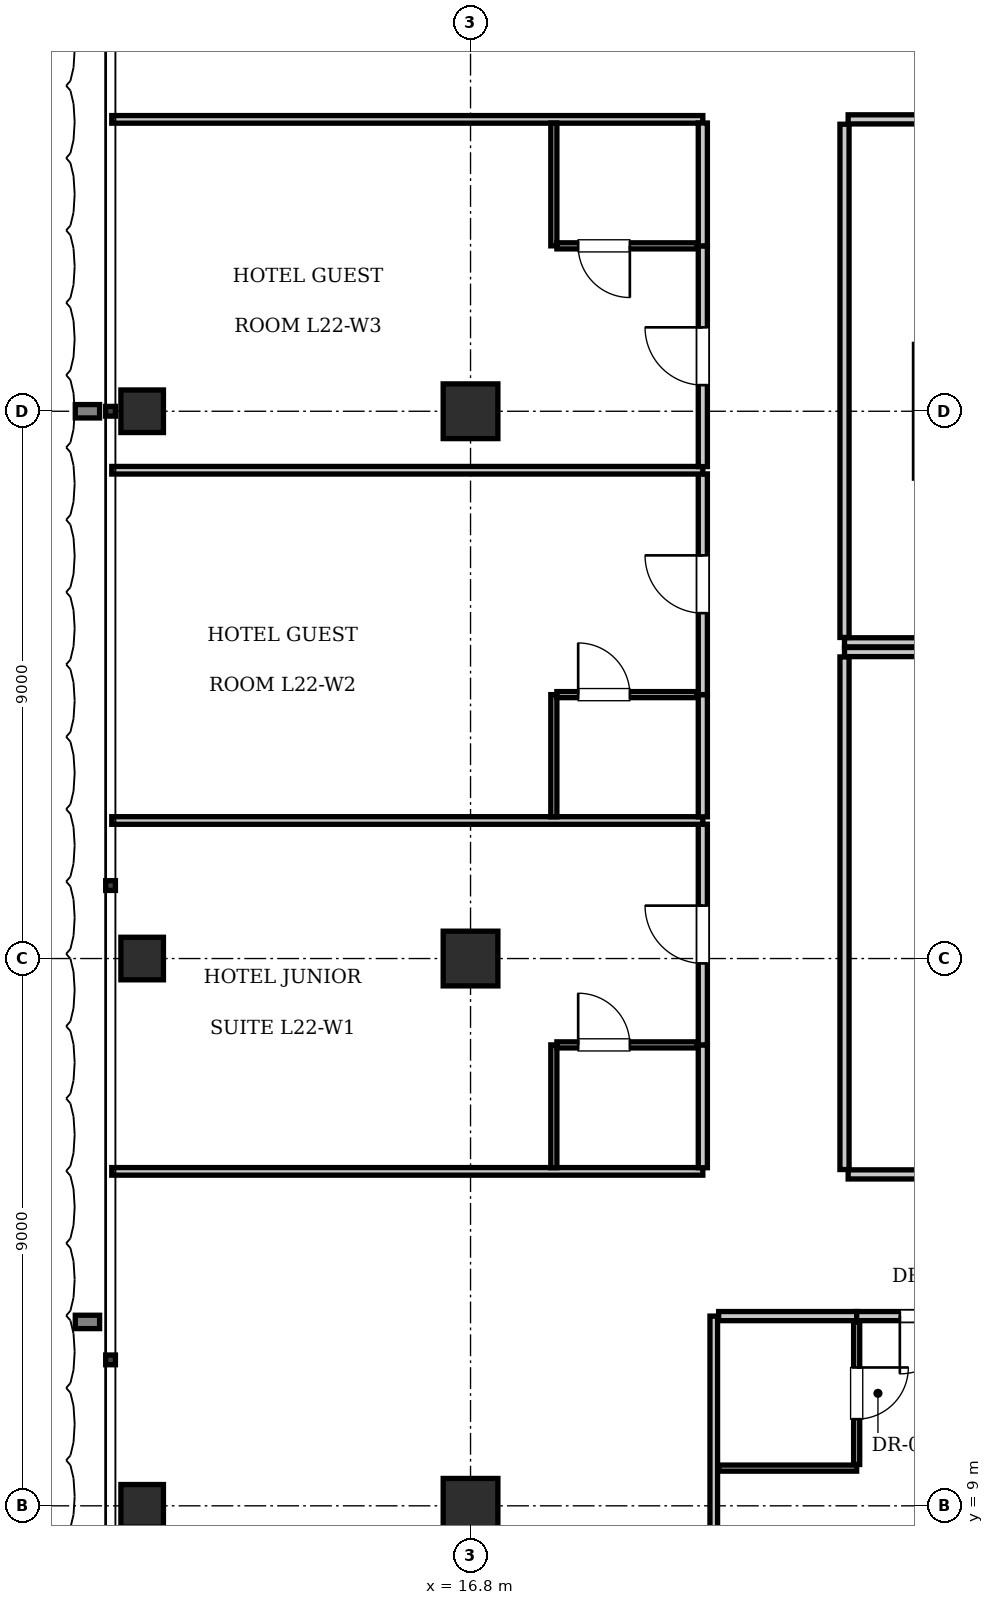
"""IFC4 building model, lengths in metres.
Left out: names, types, materials, properties, quantities, classifications, styles, units other than length and angle.
Written with IfcOpenShell. Run it as: python <this file> out.ifc"""

import sys

from ifc_helpers import new_model, si_unit, direction, frame, frame_2d, origin, origin_2d, place, context, subcontext, project, spatial, rectangle, i_section, extrude, element, fill, save


model = new_model("IFC4")
c1 = context("Model", 3, precision=1e-05, world=origin(), true_north=direction((0.0, 1.0)))
c2 = subcontext(c1, "Body", "Model", "MODEL_VIEW")
j1 = project(units=[si_unit("LENGTHUNIT", "METRE"), si_unit("PLANEANGLEUNIT", "RADIAN")], contexts=[c1])
p1 = place(None, origin())
s1 = spatial("IfcSite", under=j1, at=p1, CompositionType="ELEMENT")
p2 = place(p1, origin())
s2 = spatial("IfcBuilding", under=s1, at=p2, CompositionType="ELEMENT")
p3 = place(p2, frame((0.0, 0.0, 92.4)))
s3 = spatial("IfcBuildingStorey", under=s2, at=p3, CompositionType="ELEMENT", Elevation=92.4)
for number, where, z_axis, x_axis in (
    (1, (16.8, 9.0, 0.0), (0.0, 0.0, 1.0), (1.0, 0.0, 0.0)),
    (2, (16.8, 18.0, 0.0), (0.0, 0.0, 1.0), (1.0, 0.0, 0.0)),
    (3, (16.8, 27.0, 0.0), (0.0, 0.0, 1.0), (1.0, 0.0, 0.0)),
):
    element("IfcColumn", number, at=place(p3, frame(where, z_axis=z_axis, x_axis=x_axis)), inside=s3, PredefinedType="COLUMN", context=c2, shape_type="SweptSolid", body=[
        extrude(rectangle(XDim=0.9, YDim=0.9, at=origin_2d()), origin(), (0.0, 0.0, 1.0), 3.85),
    ])
for number, where, z_axis, x_axis in (
    (4, (11.4, 9.0, 0.0), (0.0, 0.0, 1.0), (1.0, 0.0, 0.0)),
    (5, (11.4, 18.0, 0.0), (0.0, 0.0, 1.0), (1.0, 0.0, 0.0)),
    (6, (11.4, 27.0, 0.0), (0.0, 0.0, 1.0), (1.0, 0.0, 0.0)),
):
    element("IfcColumn", number, at=place(p3, frame(where, z_axis=z_axis, x_axis=x_axis)), inside=s3, PredefinedType="COLUMN", context=c2, shape_type="SweptSolid", body=[
        extrude(i_section(OverallWidth=0.7, OverallDepth=0.7, WebThickness=0.028, FlangeThickness=0.044, at=origin_2d()), origin(), (0.0, 0.0, 1.0), 3.85),
    ])
p4 = place(p3, frame((22.95, 23.2, 0.0), z_axis=(0.0, 0.0, 1.0), x_axis=(1.0, 0.0, 0.0)))
e7 = element("IfcWall", 7, at=p4, inside=s3, PredefinedType="PARTITIONING", context=c2, shape_type="SweptSolid", body=[
    extrude(rectangle(XDim=29.7, YDim=0.15, at=frame_2d((14.85, 0.0))), origin(), (0.0, 0.0, 1.0), 3.61),
])
p5 = place(p3, frame((22.95, 23.28, 0.0), z_axis=(0.0, 0.0, 1.0), x_axis=(0.0, 1.0, 0.0)))
e8 = element("IfcWall", 8, at=p5, inside=s3, PredefinedType="PARTITIONING", context=c2, shape_type="SweptSolid", body=[
    extrude(rectangle(XDim=8.44, YDim=0.15, at=frame_2d((4.22, 0.0))), origin(), (0.0, 0.0, 1.0), 3.61),
])
p6 = place(p3, frame((23.01, 31.8, 0.0), z_axis=(0.0, 0.0, 1.0), x_axis=(1.0, 0.0, 0.0)))
e9 = element("IfcWall", 9, at=p6, inside=s3, PredefinedType="PARTITIONING", context=c2, shape_type="SweptSolid", body=[
    extrude(rectangle(XDim=4.662, YDim=0.15, at=frame_2d((2.331, 0.0))), origin(), (0.0, 0.0, 1.0), 3.61),
])
p7 = place(p6, frame((1.881, 0.0, 0.0)))
e10 = element("IfcOpeningElement", 10, at=p7, cuts=e9, PredefinedType="OPENING", context=c2, shape_type="SweptSolid", body=[
    extrude(rectangle(XDim=0.9, YDim=2.1, at=frame_2d((0.45, 1.05))), frame((0.0, 0.085, 0.0), z_axis=(0.0, -1.0, 0.0), x_axis=(1.0, 0.0, 0.0)), (0.0, 0.0, 1.0), 0.17),
])
p8 = place(p3, frame((22.95, 23.04, 0.0), z_axis=(0.0, 0.0, 1.0), x_axis=(1.0, 0.0, 0.0)))
e11 = element("IfcWall", 11, at=p8, inside=s3, PredefinedType="PARTITIONING", context=c2, shape_type="SweptSolid", body=[
    extrude(rectangle(XDim=29.7, YDim=0.15, at=frame_2d((14.85, 0.0))), origin(), (0.0, 0.0, 1.0), 3.61),
])
p9 = place(p3, frame((22.95, 14.53, 0.0), z_axis=(0.0, 0.0, 1.0), x_axis=(0.0, 1.0, 0.0)))
e12 = element("IfcWall", 12, at=p9, inside=s3, PredefinedType="PARTITIONING", context=c2, shape_type="SweptSolid", body=[
    extrude(rectangle(XDim=8.43, YDim=0.15, at=frame_2d((4.215, 0.0))), origin(), (0.0, 0.0, 1.0), 3.61),
])
p10 = place(p3, frame((23.01, 14.45, 0.0), z_axis=(0.0, 0.0, 1.0), x_axis=(1.0, 0.0, 0.0)))
e13 = element("IfcWall", 13, at=p10, inside=s3, PredefinedType="PARTITIONING", context=c2, shape_type="SweptSolid", body=[
    extrude(rectangle(XDim=10.899, YDim=0.15, at=frame_2d((5.449, 0.0))), origin(), (0.0, 0.0, 1.0), 3.61),
])
p11 = place(p10, frame((5.0, 0.0, 0.0)))
e14 = element("IfcOpeningElement", 14, at=p11, cuts=e13, PredefinedType="OPENING", context=c2, shape_type="SweptSolid", body=[
    extrude(rectangle(XDim=0.9, YDim=2.1, at=frame_2d((0.45, 1.05))), frame((0.0, 0.085, 0.0), z_axis=(0.0, -1.0, 0.0), x_axis=(1.0, 0.0, 0.0)), (0.0, 0.0, 1.0), 0.17),
])
p12 = place(p3, frame((20.8, 0.1, 0.0), z_axis=(0.0, 0.0, 1.0), x_axis=(0.0, 1.0, 0.0)))
e15 = element("IfcWall", 15, at=p12, inside=s3, PredefinedType="PARTITIONING", context=c2, shape_type="SweptSolid", body=[
    extrude(rectangle(XDim=12.02, YDim=0.125, at=frame_2d((6.01, 0.0))), origin(), (0.0, 0.0, 1.0), 3.61),
])
p13 = place(p3, frame((20.88, 12.12, 0.0), z_axis=(0.0, 0.0, 1.0), x_axis=(1.0, 0.0, 0.0)))
e16 = element("IfcWall", 16, at=p13, inside=s3, PredefinedType="PARTITIONING", context=c2, shape_type="SweptSolid", body=[
    extrude(rectangle(XDim=2.27, YDim=0.15, at=frame_2d((1.135, 0.0))), origin(), (0.0, 0.0, 1.0), 3.61),
])
p14 = place(p3, frame((20.88, 9.62, 0.0), z_axis=(0.0, 0.0, 1.0), x_axis=(1.0, 0.0, 0.0)))
e17 = element("IfcWall", 17, at=p14, inside=s3, PredefinedType="PARTITIONING", context=c2, shape_type="SweptSolid", body=[
    extrude(rectangle(XDim=2.27, YDim=0.1, at=frame_2d((1.135, 0.0))), origin(), (0.0, 0.0, 1.0), 3.61),
])
p15 = place(p3, frame((23.15, 9.68, 0.0), z_axis=(0.0, 0.0, 1.0), x_axis=(0.0, 1.0, 0.0)))
e18 = element("IfcWall", 18, at=p15, inside=s3, PredefinedType="PARTITIONING", context=c2, shape_type="SweptSolid", body=[
    extrude(rectangle(XDim=2.34, YDim=0.1, at=frame_2d((1.17, 0.0))), origin(), (0.0, 0.0, 1.0), 3.61),
])
p16 = place(p15, frame((0.745, 0.0, 0.0)))
e19 = element("IfcOpeningElement", 19, at=p16, cuts=e18, PredefinedType="OPENING", context=c2, shape_type="SweptSolid", body=[
    extrude(rectangle(XDim=0.85, YDim=2.1, at=frame_2d((0.425, 1.05))), frame((0.0, 0.06, 0.0), z_axis=(0.0, -1.0, 0.0), x_axis=(1.0, 0.0, 0.0)), (0.0, 0.0, 1.0), 0.12),
])
p17 = place(p3, frame((23.15, 12.12, 0.0), z_axis=(0.0, 0.0, 1.0), x_axis=(1.0, 0.0, 0.0)))
e20 = element("IfcWall", 20, at=p17, inside=s3, PredefinedType="PARTITIONING", context=c2, shape_type="SweptSolid", body=[
    extrude(rectangle(XDim=2.37, YDim=0.15, at=frame_2d((1.185, 0.0))), origin(), (0.0, 0.0, 1.0), 3.61),
])
p18 = place(p17, frame((0.71, 0.0, 0.0)))
e21 = element("IfcOpeningElement", 21, at=p18, cuts=e20, PredefinedType="OPENING", context=c2, shape_type="SweptSolid", body=[
    extrude(rectangle(XDim=0.95, YDim=2.15, at=frame_2d((0.475, 1.075))), frame((0.0, 0.085, 0.0), z_axis=(0.0, -1.0, 0.0), x_axis=(1.0, 0.0, 0.0)), (0.0, 0.0, 1.0), 0.17),
])
for number, where, z_axis, x_axis in (
    (22, (10.9, 14.5, 0.0), (0.0, 0.0, 1.0), (1.0, 0.0, 0.0)),
    (23, (10.9, 31.8, 0.0), (0.0, 0.0, 1.0), (1.0, 0.0, 0.0)),
):
    element("IfcWall", number, at=place(p3, frame(where, z_axis=z_axis, x_axis=x_axis)), inside=s3, PredefinedType="PARTITIONING", context=c2, shape_type="SweptSolid", body=[
        extrude(rectangle(XDim=9.72, YDim=0.125, at=frame_2d((4.86, 0.0))), origin(), (0.0, 0.0, 1.0), 3.61),
    ])
p19 = place(p3, frame((20.62, 14.56, 0.0), z_axis=(0.0, 0.0, 1.0), x_axis=(0.0, 1.0, 0.0)))
e24 = element("IfcWall", 24, at=p19, inside=s3, PredefinedType="PARTITIONING", context=c2, shape_type="SweptSolid", body=[
    extrude(rectangle(XDim=2.02, YDim=0.15, at=frame_2d((1.01, 0.0))), origin(), (0.0, 0.0, 1.0), 3.61),
])
p20 = place(p3, frame((20.62, 16.58, 0.0), z_axis=(0.0, 0.0, 1.0), x_axis=(0.0, 1.0, 0.0)))
e25 = element("IfcWall", 25, at=p20, inside=s3, PredefinedType="PARTITIONING", context=c2, shape_type="SweptSolid", body=[
    extrude(rectangle(XDim=3.63, YDim=0.15, at=frame_2d((1.815, 0.0))), origin(), (0.0, 0.0, 1.0), 3.61),
])
p21 = place(p20, frame((1.34, 0.0, 0.0)))
e26 = element("IfcOpeningElement", 26, at=p21, cuts=e25, PredefinedType="OPENING", context=c2, shape_type="SweptSolid", body=[
    extrude(rectangle(XDim=0.95, YDim=2.15, at=frame_2d((0.475, 1.075))), frame((0.0, 0.085, 0.0), z_axis=(0.0, -1.0, 0.0), x_axis=(1.0, 0.0, 0.0)), (0.0, 0.0, 1.0), 0.17),
])
p22 = place(p3, frame((18.17, 14.56, 0.0), z_axis=(0.0, 0.0, 1.0), x_axis=(0.0, 1.0, 0.0)))
e27 = element("IfcWall", 27, at=p22, inside=s3, PredefinedType="PARTITIONING", context=c2, shape_type="SweptSolid", body=[
    extrude(rectangle(XDim=2.02, YDim=0.1, at=frame_2d((1.01, 0.0))), origin(), (0.0, 0.0, 1.0), 3.61),
])
p23 = place(p3, frame((18.22, 16.58, 0.0), z_axis=(0.0, 0.0, 1.0), x_axis=(1.0, 0.0, 0.0)))
e28 = element("IfcWall", 28, at=p23, inside=s3, PredefinedType="PARTITIONING", context=c2, shape_type="SweptSolid", body=[
    extrude(rectangle(XDim=2.3, YDim=0.1, at=frame_2d((1.15, 0.0))), origin(), (0.0, 0.0, 1.0), 3.61),
])
p24 = place(p23, frame((0.35, 0.0, 0.0)))
e29 = element("IfcOpeningElement", 29, at=p24, cuts=e28, PredefinedType="OPENING", context=c2, shape_type="SweptSolid", body=[
    extrude(rectangle(XDim=0.85, YDim=2.1, at=frame_2d((0.425, 1.05))), frame((0.0, 0.06, 0.0), z_axis=(0.0, -1.0, 0.0), x_axis=(1.0, 0.0, 0.0)), (0.0, 0.0, 1.0), 0.12),
])
p25 = place(p3, frame((10.9, 20.27, 0.0), z_axis=(0.0, 0.0, 1.0), x_axis=(1.0, 0.0, 0.0)))
e30 = element("IfcWall", 30, at=p25, inside=s3, PredefinedType="PARTITIONING", context=c2, shape_type="SweptSolid", body=[
    extrude(rectangle(XDim=9.72, YDim=0.125, at=frame_2d((4.86, 0.0))), origin(), (0.0, 0.0, 1.0), 3.61),
])
p26 = place(p3, frame((20.62, 20.33, 0.0), z_axis=(0.0, 0.0, 1.0), x_axis=(0.0, 1.0, 0.0)))
e31 = element("IfcWall", 31, at=p26, inside=s3, PredefinedType="PARTITIONING", context=c2, shape_type="SweptSolid", body=[
    extrude(rectangle(XDim=2.01, YDim=0.15, at=frame_2d((1.005, 0.0))), origin(), (0.0, 0.0, 1.0), 3.61),
])
p27 = place(p3, frame((20.62, 22.34, 0.0), z_axis=(0.0, 0.0, 1.0), x_axis=(0.0, 1.0, 0.0)))
e32 = element("IfcWall", 32, at=p27, inside=s3, PredefinedType="PARTITIONING", context=c2, shape_type="SweptSolid", body=[
    extrude(rectangle(XDim=3.63, YDim=0.15, at=frame_2d((1.815, 0.0))), origin(), (0.0, 0.0, 1.0), 3.61),
])
p28 = place(p27, frame((1.34, 0.0, 0.0)))
e33 = element("IfcOpeningElement", 33, at=p28, cuts=e32, PredefinedType="OPENING", context=c2, shape_type="SweptSolid", body=[
    extrude(rectangle(XDim=0.95, YDim=2.15, at=frame_2d((0.475, 1.075))), frame((0.0, 0.085, 0.0), z_axis=(0.0, -1.0, 0.0), x_axis=(1.0, 0.0, 0.0)), (0.0, 0.0, 1.0), 0.17),
])
p29 = place(p3, frame((18.17, 20.33, 0.0), z_axis=(0.0, 0.0, 1.0), x_axis=(0.0, 1.0, 0.0)))
e34 = element("IfcWall", 34, at=p29, inside=s3, PredefinedType="PARTITIONING", context=c2, shape_type="SweptSolid", body=[
    extrude(rectangle(XDim=2.01, YDim=0.1, at=frame_2d((1.005, 0.0))), origin(), (0.0, 0.0, 1.0), 3.61),
])
p30 = place(p3, frame((18.22, 22.34, 0.0), z_axis=(0.0, 0.0, 1.0), x_axis=(1.0, 0.0, 0.0)))
e35 = element("IfcWall", 35, at=p30, inside=s3, PredefinedType="PARTITIONING", context=c2, shape_type="SweptSolid", body=[
    extrude(rectangle(XDim=2.3, YDim=0.1, at=frame_2d((1.15, 0.0))), origin(), (0.0, 0.0, 1.0), 3.61),
])
p31 = place(p30, frame((0.35, 0.0, 0.0)))
e36 = element("IfcOpeningElement", 36, at=p31, cuts=e35, PredefinedType="OPENING", context=c2, shape_type="SweptSolid", body=[
    extrude(rectangle(XDim=0.85, YDim=2.1, at=frame_2d((0.425, 1.05))), frame((0.0, 0.06, 0.0), z_axis=(0.0, -1.0, 0.0), x_axis=(1.0, 0.0, 0.0)), (0.0, 0.0, 1.0), 0.12),
])
p32 = place(p3, frame((10.9, 26.03, 0.0), z_axis=(0.0, 0.0, 1.0), x_axis=(1.0, 0.0, 0.0)))
e37 = element("IfcWall", 37, at=p32, inside=s3, PredefinedType="PARTITIONING", context=c2, shape_type="SweptSolid", body=[
    extrude(rectangle(XDim=9.72, YDim=0.125, at=frame_2d((4.86, 0.0))), origin(), (0.0, 0.0, 1.0), 3.61),
])
p33 = place(p3, frame((20.62, 26.09, 0.0), z_axis=(0.0, 0.0, 1.0), x_axis=(0.0, 1.0, 0.0)))
e38 = element("IfcWall", 38, at=p33, inside=s3, PredefinedType="PARTITIONING", context=c2, shape_type="SweptSolid", body=[
    extrude(rectangle(XDim=3.63, YDim=0.15, at=frame_2d((1.815, 0.0))), origin(), (0.0, 0.0, 1.0), 3.61),
])
p34 = place(p33, frame((1.34, 0.0, 0.0)))
e39 = element("IfcOpeningElement", 39, at=p34, cuts=e38, PredefinedType="OPENING", context=c2, shape_type="SweptSolid", body=[
    extrude(rectangle(XDim=0.95, YDim=2.15, at=frame_2d((0.475, 1.075))), frame((0.0, 0.085, 0.0), z_axis=(0.0, -1.0, 0.0), x_axis=(1.0, 0.0, 0.0)), (0.0, 0.0, 1.0), 0.17),
])
p35 = place(p3, frame((20.62, 29.72, 0.0), z_axis=(0.0, 0.0, 1.0), x_axis=(0.0, 1.0, 0.0)))
e40 = element("IfcWall", 40, at=p35, inside=s3, PredefinedType="PARTITIONING", context=c2, shape_type="SweptSolid", body=[
    extrude(rectangle(XDim=2.02, YDim=0.15, at=frame_2d((1.01, 0.0))), origin(), (0.0, 0.0, 1.0), 3.61),
])
p36 = place(p3, frame((18.17, 29.72, 0.0), z_axis=(0.0, 0.0, 1.0), x_axis=(0.0, 1.0, 0.0)))
e41 = element("IfcWall", 41, at=p36, inside=s3, PredefinedType="PARTITIONING", context=c2, shape_type="SweptSolid", body=[
    extrude(rectangle(XDim=2.02, YDim=0.1, at=frame_2d((1.01, 0.0))), origin(), (0.0, 0.0, 1.0), 3.61),
])
p37 = place(p3, frame((18.22, 29.72, 0.0), z_axis=(0.0, 0.0, 1.0), x_axis=(1.0, 0.0, 0.0)))
e42 = element("IfcWall", 42, at=p37, inside=s3, PredefinedType="PARTITIONING", context=c2, shape_type="SweptSolid", body=[
    extrude(rectangle(XDim=2.3, YDim=0.1, at=frame_2d((1.15, 0.0))), origin(), (0.0, 0.0, 1.0), 3.61),
])
p38 = place(p37, frame((0.35, 0.0, 0.0)))
e43 = element("IfcOpeningElement", 43, at=p38, cuts=e42, PredefinedType="OPENING", context=c2, shape_type="SweptSolid", body=[
    extrude(rectangle(XDim=0.85, YDim=2.1, at=frame_2d((0.425, 1.05))), frame((0.0, 0.06, 0.0), z_axis=(0.0, -1.0, 0.0), x_axis=(1.0, 0.0, 0.0)), (0.0, 0.0, 1.0), 0.12),
])
p39 = place(p16, frame((0.85, 0.0, 0.0), z_axis=(0.0, 0.0, 1.0), x_axis=(-1.0, 0.0, 0.0)))
e44 = element("IfcDoor", 44, at=p39, inside=s3, OperationType="SINGLE_SWING_LEFT", PredefinedType="DOOR", context=c2, shape_type="SweptSolid", body=[
    extrude(rectangle(XDim=0.85, YDim=2.1, at=frame_2d((0.425, 1.05))), frame((0.0, 0.025, 0.0), z_axis=(0.0, -1.0, 0.0), x_axis=(1.0, 0.0, 0.0)), (0.0, 0.0, 1.0), 0.05),
])
fill(e19, e44)
p40 = place(p18, frame((0.95, 0.0, 0.0), z_axis=(0.0, 0.0, 1.0), x_axis=(-1.0, 0.0, 0.0)))
e45 = element("IfcDoor", 45, at=p40, inside=s3, OperationType="SINGLE_SWING_RIGHT", PredefinedType="DOOR", context=c2, shape_type="SweptSolid", body=[
    extrude(rectangle(XDim=0.95, YDim=2.15, at=frame_2d((0.475, 1.075))), frame((0.0, 0.025, 0.0), z_axis=(0.0, -1.0, 0.0), x_axis=(1.0, 0.0, 0.0)), (0.0, 0.0, 1.0), 0.05),
])
fill(e21, e45)
p41 = place(p24, origin())
e46 = element("IfcDoor", 46, at=p41, inside=s3, OperationType="SINGLE_SWING_LEFT", PredefinedType="DOOR", context=c2, shape_type="SweptSolid", body=[
    extrude(rectangle(XDim=0.85, YDim=2.1, at=frame_2d((0.425, 1.05))), frame((0.0, 0.025, 0.0), z_axis=(0.0, -1.0, 0.0), x_axis=(1.0, 0.0, 0.0)), (0.0, 0.0, 1.0), 0.05),
])
fill(e29, e46)
p42 = place(p21, origin())
e47 = element("IfcDoor", 47, at=p42, inside=s3, OperationType="SINGLE_SWING_RIGHT", PredefinedType="DOOR", context=c2, shape_type="SweptSolid", body=[
    extrude(rectangle(XDim=0.95, YDim=2.15, at=frame_2d((0.475, 1.075))), frame((0.0, 0.025, 0.0), z_axis=(0.0, -1.0, 0.0), x_axis=(1.0, 0.0, 0.0)), (0.0, 0.0, 1.0), 0.05),
])
fill(e26, e47)
p43 = place(p31, origin())
e48 = element("IfcDoor", 48, at=p43, inside=s3, OperationType="SINGLE_SWING_LEFT", PredefinedType="DOOR", context=c2, shape_type="SweptSolid", body=[
    extrude(rectangle(XDim=0.85, YDim=2.1, at=frame_2d((0.425, 1.05))), frame((0.0, 0.025, 0.0), z_axis=(0.0, -1.0, 0.0), x_axis=(1.0, 0.0, 0.0)), (0.0, 0.0, 1.0), 0.05),
])
fill(e36, e48)
p44 = place(p28, origin())
e49 = element("IfcDoor", 49, at=p44, inside=s3, OperationType="SINGLE_SWING_RIGHT", PredefinedType="DOOR", context=c2, shape_type="SweptSolid", body=[
    extrude(rectangle(XDim=0.95, YDim=2.15, at=frame_2d((0.475, 1.075))), frame((0.0, 0.025, 0.0), z_axis=(0.0, -1.0, 0.0), x_axis=(1.0, 0.0, 0.0)), (0.0, 0.0, 1.0), 0.05),
])
fill(e33, e49)
p45 = place(p38, frame((0.85, 0.0, 0.0), z_axis=(0.0, 0.0, 1.0), x_axis=(-1.0, 0.0, 0.0)))
e50 = element("IfcDoor", 50, at=p45, inside=s3, OperationType="SINGLE_SWING_LEFT", PredefinedType="DOOR", context=c2, shape_type="SweptSolid", body=[
    extrude(rectangle(XDim=0.85, YDim=2.1, at=frame_2d((0.425, 1.05))), frame((0.0, 0.025, 0.0), z_axis=(0.0, -1.0, 0.0), x_axis=(1.0, 0.0, 0.0)), (0.0, 0.0, 1.0), 0.05),
])
fill(e43, e50)
p46 = place(p34, origin())
e51 = element("IfcDoor", 51, at=p46, inside=s3, OperationType="SINGLE_SWING_RIGHT", PredefinedType="DOOR", context=c2, shape_type="SweptSolid", body=[
    extrude(rectangle(XDim=0.95, YDim=2.15, at=frame_2d((0.475, 1.075))), frame((0.0, 0.025, 0.0), z_axis=(0.0, -1.0, 0.0), x_axis=(1.0, 0.0, 0.0)), (0.0, 0.0, 1.0), 0.05),
])
fill(e39, e51)
save(model, sys.argv[1])
